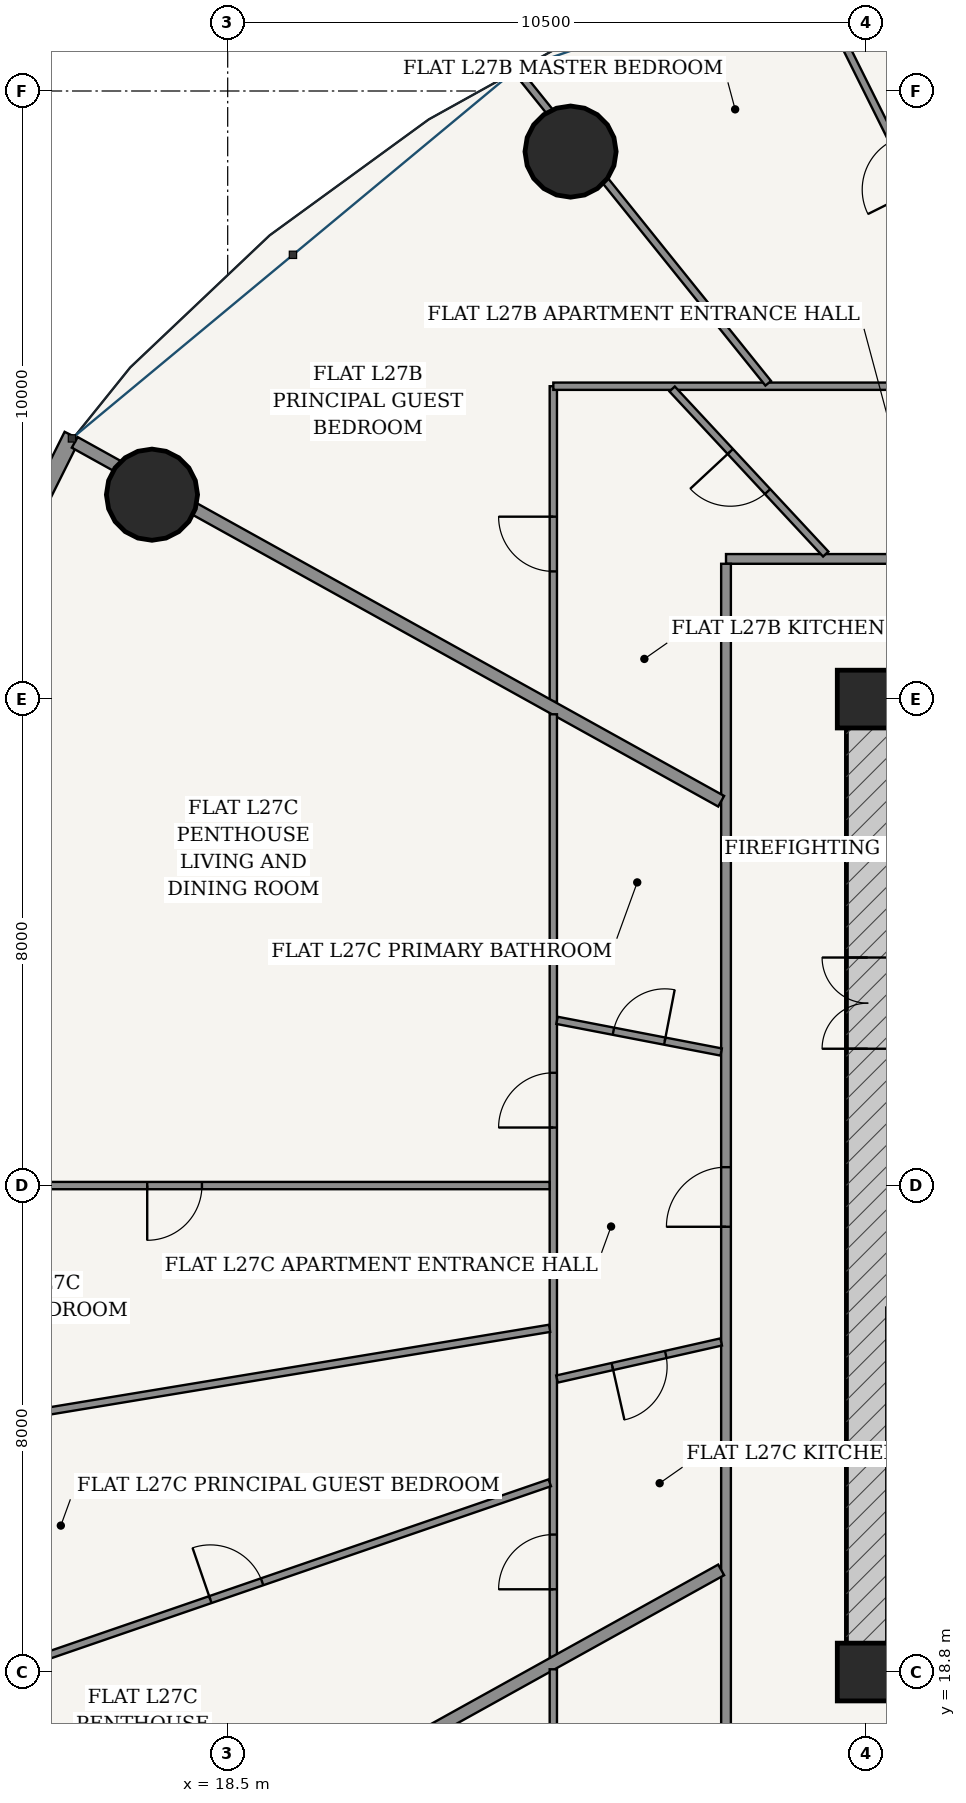
"""IFC4 building model, lengths in metres.
Left out: names, types, materials, properties, quantities, classifications, styles, units other than length and angle.
Written with IfcOpenShell. Run it as: python <this file> out.ifc"""

import sys

from ifc_helpers import new_model, si_unit, direction, frame, frame_2d, origin, origin_2d, place, context, subcontext, project, spatial, rectangle, hollow_circle, extrude, source, transform, mapped, element, fill, save


model = new_model("IFC4")
c1 = context("Model", 3, precision=1e-05, world=origin(), true_north=direction((-0.2419218956, 0.970295726276)))
c2 = subcontext(c1, "Body", "Model", "MODEL_VIEW")
j1 = project(units=[si_unit("LENGTHUNIT", "METRE"), si_unit("PLANEANGLEUNIT", "RADIAN")], contexts=[c1])
p1 = place(None, origin())
s1 = spatial("IfcSite", under=j1, at=p1, CompositionType="ELEMENT")
p2 = place(p1, origin())
s2 = spatial("IfcBuilding", under=s1, at=p2, CompositionType="ELEMENT")
p3 = place(p2, frame((0.0, 0.0, 105.0)))
s3 = spatial("IfcBuildingStorey", under=s2, at=p3, CompositionType="ELEMENT", Elevation=105.0)
for number, where, z_axis, x_axis in (
    (1, (29.0, 18.8, 0.0), (0.0, 0.0, 1.0), (1.0, 0.0, 0.0)),
    (2, (29.0, 34.8, 0.0), (0.0, 0.0, 1.0), (1.0, 0.0, 0.0)),
):
    element("IfcColumn", number, at=place(p3, frame(where, z_axis=z_axis, x_axis=x_axis)), inside=s3, PredefinedType="COLUMN", context=c2, shape_type="SweptSolid", body=[
        extrude(rectangle(XDim=0.95, YDim=0.95, at=origin_2d()), origin(), (0.0, 0.0, 1.0), 3.6),
    ])
p4 = place(p3, frame((28.675, 18.825, 0.0), z_axis=(0.0, 0.0, 1.0), x_axis=(1.0, 0.0, 0.0)))
e3 = element("IfcWall", 3, at=p4, inside=s3, PredefinedType="SHEAR", context=c2, shape_type="SweptSolid", body=[
    extrude(rectangle(XDim=18.65, YDim=0.7, at=frame_2d((9.325, 0.0))), origin(), (0.0, 0.0, 1.0), 3.325),
])
p5 = place(p4, frame((6.877, 0.0, 0.0)))
e4 = element("IfcOpeningElement", 4, at=p5, cuts=e3, PredefinedType="OPENING", context=c2, shape_type="SweptSolid", body=[
    extrude(rectangle(XDim=0.85, YDim=2.1, at=frame_2d((0.425, 1.05))), frame((0.0, 0.36, 0.0), z_axis=(0.0, -1.0, 0.0), x_axis=(1.0, 0.0, 0.0)), (0.0, 0.0, 1.0), 0.72),
])
p6 = place(p4, frame((8.9, 0.0, 0.0)))
e5 = element("IfcOpeningElement", 5, at=p6, cuts=e3, PredefinedType="OPENING", context=c2, shape_type="SweptSolid", body=[
    extrude(rectangle(XDim=0.85, YDim=2.1, at=frame_2d((0.425, 1.05))), frame((0.0, 0.36, 0.0), z_axis=(0.0, -1.0, 0.0), x_axis=(1.0, 0.0, 0.0)), (0.0, 0.0, 1.0), 0.72),
])
p7 = place(p4, frame((10.923, 0.0, 0.0)))
e6 = element("IfcOpeningElement", 6, at=p7, cuts=e3, PredefinedType="OPENING", context=c2, shape_type="SweptSolid", body=[
    extrude(rectangle(XDim=0.85, YDim=2.1, at=frame_2d((0.425, 1.05))), frame((0.0, 0.36, 0.0), z_axis=(0.0, -1.0, 0.0), x_axis=(1.0, 0.0, 0.0)), (0.0, 0.0, 1.0), 0.72),
])
p8 = place(p3, frame((28.675, 34.775, 0.0), z_axis=(0.0, 0.0, 1.0), x_axis=(1.0, 0.0, 0.0)))
e7 = element("IfcWall", 7, at=p8, inside=s3, PredefinedType="SHEAR", context=c2, shape_type="SweptSolid", body=[
    extrude(rectangle(XDim=18.65, YDim=0.7, at=frame_2d((9.325, 0.0))), origin(), (0.0, 0.0, 1.0), 3.325),
])
p9 = place(p8, frame((7.357, 0.0, 0.0)))
e8 = element("IfcOpeningElement", 8, at=p9, cuts=e7, PredefinedType="OPENING", context=c2, shape_type="SweptSolid", body=[
    extrude(rectangle(XDim=0.86, YDim=2.1, at=frame_2d((0.43, 1.05))), frame((0.0, 0.36, 0.0), z_axis=(0.0, -1.0, 0.0), x_axis=(1.0, 0.0, 0.0)), (0.0, 0.0, 1.0), 0.72),
])
p10 = place(p8, frame((10.438, 0.0, 0.0)))
e9 = element("IfcOpeningElement", 9, at=p10, cuts=e7, PredefinedType="OPENING", context=c2, shape_type="SweptSolid", body=[
    extrude(rectangle(XDim=0.85, YDim=2.1, at=frame_2d((0.425, 1.05))), frame((0.0, 0.36, 0.0), z_axis=(0.0, -1.0, 0.0), x_axis=(1.0, 0.0, 0.0)), (0.0, 0.0, 1.0), 0.72),
])
p11 = place(p3, frame((29.025, 19.175, 0.0), z_axis=(0.0, 0.0, 1.0), x_axis=(0.0, 1.0, 0.0)))
e10 = element("IfcWall", 10, at=p11, inside=s3, PredefinedType="SHEAR", context=c2, shape_type="SweptSolid", body=[
    extrude(rectangle(XDim=15.25, YDim=0.7, at=frame_2d((7.625, 0.0))), origin(), (0.0, 0.0, 1.0), 3.325),
])
p12 = place(p11, frame((9.875, 0.0, 0.0)))
e11 = element("IfcOpeningElement", 11, at=p12, cuts=e10, PredefinedType="OPENING", context=c2, shape_type="SweptSolid", body=[
    extrude(rectangle(XDim=1.5, YDim=2.2, at=frame_2d((0.75, 1.1))), frame((0.0, 0.36, 0.0), z_axis=(0.0, -1.0, 0.0), x_axis=(1.0, 0.0, 0.0)), (0.0, 0.0, 1.0), 0.72),
])
for number, where, z_axis, x_axis in (
    (12, (24.138, 43.803, 0.0), (0.0, 0.0, 1.0), (1.0, 0.0, 0.0)),
    (13, (17.255, 38.161, 0.0), (0.0, 0.0, 1.0), (1.0, 0.0, 0.0)),
):
    element("IfcColumn", number, at=place(p3, frame(where, z_axis=z_axis, x_axis=x_axis)), inside=s3, PredefinedType="COLUMN", context=c2, shape_type="SweptSolid", body=[
        extrude(hollow_circle(Radius=0.75, WallThickness=0.045, at=origin_2d()), origin(), (0.0, 0.0, 1.0), 3.6),
    ])
p13 = place(p3, frame((15.944, 39.133, 0.0), z_axis=(0.0, 0.0, 1.0), x_axis=(-0.446263788661, -0.894901464369, 0.0)))
e14 = element("IfcWall", 14, at=p13, inside=s3, PredefinedType="SOLIDWALL", context=c2, shape_type="SweptSolid", body=[
    extrude(rectangle(XDim=9.05, YDim=0.28, at=frame_2d((4.525, 0.0))), origin(), (0.0, 0.0, 1.0), 3.325),
])
p14 = place(p13, frame((1.394, 0.0, 0.85)))
e15 = element("IfcOpeningElement", 15, at=p14, cuts=e14, PredefinedType="OPENING", context=c2, shape_type="SweptSolid", body=[
    extrude(rectangle(XDim=2.1, YDim=1.95, at=frame_2d((1.05, 0.975))), frame((0.0, 0.15, 0.0), z_axis=(0.0, -1.0, 0.0), x_axis=(1.0, 0.0, 0.0)), (0.0, 0.0, 1.0), 0.3),
])
p15 = place(p13, frame((5.557, 0.0, 0.85)))
e16 = element("IfcOpeningElement", 16, at=p15, cuts=e14, PredefinedType="OPENING", context=c2, shape_type="SweptSolid", body=[
    extrude(rectangle(XDim=2.1, YDim=1.95, at=frame_2d((1.05, 0.975))), frame((0.0, 0.15, 0.0), z_axis=(0.0, -1.0, 0.0), x_axis=(1.0, 0.0, 0.0)), (0.0, 0.0, 1.0), 0.3),
])
p16 = place(p3, frame((26.695, 37.105, 0.0), z_axis=(0.0, 0.0, 1.0), x_axis=(1.0, 0.0, 0.0)))
e17 = element("IfcWall", 17, at=p16, inside=s3, PredefinedType="PARTITIONING", context=c2, shape_type="SweptSolid", body=[
    extrude(rectangle(XDim=22.61, YDim=0.16, at=frame_2d((11.305, 0.0))), origin(), (0.0, 0.0, 1.0), 2.767),
])
p17 = place(p16, frame((4.925, 0.0, 0.0)))
e18 = element("IfcOpeningElement", 18, at=p17, cuts=e17, PredefinedType="OPENING", context=c2, shape_type="SweptSolid", body=[
    extrude(rectangle(XDim=0.98, YDim=2.2, at=frame_2d((0.49, 1.1))), frame((0.0, 0.09, 0.0), z_axis=(0.0, -1.0, 0.0), x_axis=(1.0, 0.0, 0.0)), (0.0, 0.0, 1.0), 0.18),
])
p18 = place(p3, frame((26.695, 16.575, 0.0), z_axis=(0.0, 0.0, 1.0), x_axis=(0.0, 1.0, 0.0)))
e19 = element("IfcWall", 19, at=p18, inside=s3, PredefinedType="PARTITIONING", context=c2, shape_type="SweptSolid", body=[
    extrude(rectangle(XDim=20.45, YDim=0.16, at=frame_2d((10.225, 0.0))), origin(), (0.0, 0.0, 1.0), 2.767),
])
p19 = place(p18, frame((9.547, 0.0, 0.0)))
e20 = element("IfcOpeningElement", 20, at=p19, cuts=e19, PredefinedType="OPENING", context=c2, shape_type="SweptSolid", body=[
    extrude(rectangle(XDim=0.98, YDim=2.2, at=frame_2d((0.49, 1.1))), frame((0.0, 0.09, 0.0), z_axis=(0.0, -1.0, 0.0), x_axis=(1.0, 0.0, 0.0)), (0.0, 0.0, 1.0), 0.18),
])
p20 = place(p3, frame((23.855, 34.754, 0.0), z_axis=(0.0, 0.0, 1.0), x_axis=(0.0, 1.0, 0.0)))
e21 = element("IfcWall", 21, at=p20, inside=s3, PredefinedType="PARTITIONING", context=c2, shape_type="SweptSolid", body=[
    extrude(rectangle(XDim=5.191, YDim=0.12, at=frame_2d((2.595, 0.0))), origin(), (0.0, 0.0, 1.0), 3.004),
])
p21 = place(p20, frame((2.145, 0.0, 0.0)))
e22 = element("IfcOpeningElement", 22, at=p21, cuts=e21, PredefinedType="OPENING", context=c2, shape_type="SweptSolid", body=[
    extrude(rectangle(XDim=0.9, YDim=2.15, at=frame_2d((0.45, 1.075))), frame((0.0, 0.07, 0.0), z_axis=(0.0, -1.0, 0.0), x_axis=(1.0, 0.0, 0.0)), (0.0, 0.0, 1.0), 0.14),
])
p22 = place(p3, frame((23.855, 39.945, 0.0), z_axis=(0.0, 0.0, 1.0), x_axis=(1.0, 0.0, 0.0)))
e23 = element("IfcWall", 23, at=p22, inside=s3, PredefinedType="PARTITIONING", context=c2, shape_type="SweptSolid", body=[
    extrude(rectangle(XDim=17.19, YDim=0.12, at=frame_2d((8.595, 0.0))), origin(), (0.0, 0.0, 1.0), 2.767),
])
p23 = place(p22, frame((9.133, 0.0, 0.0)))
e24 = element("IfcOpeningElement", 24, at=p23, cuts=e23, PredefinedType="OPENING", context=c2, shape_type="SweptSolid", body=[
    extrude(rectangle(XDim=0.9, YDim=2.15, at=frame_2d((0.45, 1.075))), frame((0.0, 0.07, 0.0), z_axis=(0.0, -1.0, 0.0), x_axis=(1.0, 0.0, 0.0)), (0.0, 0.0, 1.0), 0.14),
])
p24 = place(p3, frame((31.419, 40.0, 0.0), z_axis=(0.0, 0.0, 1.0), x_axis=(-0.446188142997, 0.894939182877, 0.0)))
e25 = element("IfcWall", 25, at=p24, inside=s3, PredefinedType="PARTITIONING", context=c2, shape_type="SweptSolid", body=[
    extrude(rectangle(XDim=8.002, YDim=0.12, at=frame_2d((4.001, 0.0))), origin(), (0.0, 0.0, 1.0), 2.767),
])
p25 = place(p24, frame((3.551, 0.0, 0.0)))
e26 = element("IfcOpeningElement", 26, at=p25, cuts=e25, PredefinedType="OPENING", context=c2, shape_type="SweptSolid", body=[
    extrude(rectangle(XDim=0.9, YDim=2.15, at=frame_2d((0.45, 1.075))), frame((0.0, 0.07, 0.0), z_axis=(0.0, -1.0, 0.0), x_axis=(1.0, 0.0, 0.0)), (0.0, 0.0, 1.0), 0.14),
])
p26 = place(p3, frame((27.389, 39.993, 0.0), z_axis=(0.0, 0.0, 1.0), x_axis=(-0.626719700294, 0.779244773651, 0.0)))
e27 = element("IfcWall", 27, at=p26, inside=s3, PredefinedType="PARTITIONING", context=c2, shape_type="SweptSolid", body=[
    extrude(rectangle(XDim=6.537, YDim=0.12, at=frame_2d((3.269, 0.0))), origin(), (0.0, 0.0, 1.0), 2.767),
])
p27 = place(p3, frame((28.335, 37.185, 0.0), z_axis=(0.0, 0.0, 1.0), x_axis=(-0.681236086606, 0.732063791145, 0.0)))
e28 = element("IfcWall", 28, at=p27, inside=s3, PredefinedType="PARTITIONING", context=c2, shape_type="SweptSolid", body=[
    extrude(rectangle(XDim=3.708, YDim=0.12, at=frame_2d((1.854, 0.0))), origin(), (0.0, 0.0, 1.0), 2.767),
])
p28 = place(p27, frame((1.404, 0.0, 0.0)))
e29 = element("IfcOpeningElement", 29, at=p28, cuts=e28, PredefinedType="OPENING", context=c2, shape_type="SweptSolid", body=[
    extrude(rectangle(XDim=0.9, YDim=2.15, at=frame_2d((0.45, 1.075))), frame((0.0, 0.07, 0.0), z_axis=(0.0, -1.0, 0.0), x_axis=(1.0, 0.0, 0.0)), (0.0, 0.0, 1.0), 0.14),
])
p29 = place(p3, frame((26.615, 33.12, 0.0), z_axis=(0.0, 0.0, 1.0), x_axis=(-0.874319192772, 0.485351366692, 0.0)))
e30 = element("IfcWall", 30, at=p29, inside=s3, PredefinedType="PARTITIONING", context=c2, shape_type="SweptSolid", body=[
    extrude(rectangle(XDim=12.158, YDim=0.2, at=frame_2d((6.079, 0.0))), origin(), (0.0, 0.0, 1.0), 2.767),
])
p30 = place(p3, frame((23.855, 19.05, 0.0), z_axis=(0.0, 0.0, 1.0), x_axis=(0.0, 1.0, 0.0)))
e31 = element("IfcWall", 31, at=p30, inside=s3, PredefinedType="PARTITIONING", context=c2, shape_type="SweptSolid", body=[
    extrude(rectangle(XDim=15.501, YDim=0.12, at=frame_2d((7.75, 0.0))), origin(), (0.0, 0.0, 1.0), 2.767),
])
p31 = place(p30, frame((8.705, 0.0, 0.0)))
e32 = element("IfcOpeningElement", 32, at=p31, cuts=e31, PredefinedType="OPENING", context=c2, shape_type="SweptSolid", body=[
    extrude(rectangle(XDim=0.9, YDim=2.15, at=frame_2d((0.45, 1.075))), frame((0.0, 0.07, 0.0), z_axis=(0.0, -1.0, 0.0), x_axis=(1.0, 0.0, 0.0)), (0.0, 0.0, 1.0), 0.14),
])
p32 = place(p30, frame((1.111, 0.0, 0.0)))
e33 = element("IfcOpeningElement", 33, at=p32, cuts=e31, PredefinedType="OPENING", context=c2, shape_type="SweptSolid", body=[
    extrude(rectangle(XDim=0.9, YDim=2.15, at=frame_2d((0.45, 1.075))), frame((0.0, 0.07, 0.0), z_axis=(0.0, -1.0, 0.0), x_axis=(1.0, 0.0, 0.0)), (0.0, 0.0, 1.0), 0.14),
])
p33 = place(p3, frame((23.793, 26.8, 0.0), z_axis=(0.0, 0.0, 1.0), x_axis=(-1.0, 0.0, 0.0)))
e34 = element("IfcWall", 34, at=p33, inside=s3, PredefinedType="PARTITIONING", context=c2, shape_type="SweptSolid", body=[
    extrude(rectangle(XDim=12.333, YDim=0.12, at=frame_2d((6.167, 0.0))), origin(), (0.0, 0.0, 1.0), 2.767),
])
p34 = place(p33, frame((5.717, 0.0, 0.0)))
e35 = element("IfcOpeningElement", 35, at=p34, cuts=e34, PredefinedType="OPENING", context=c2, shape_type="SweptSolid", body=[
    extrude(rectangle(XDim=0.9, YDim=2.15, at=frame_2d((0.45, 1.075))), frame((0.0, 0.07, 0.0), z_axis=(0.0, -1.0, 0.0), x_axis=(1.0, 0.0, 0.0)), (0.0, 0.0, 1.0), 0.14),
])
p35 = place(p3, frame((23.794, 24.452, 0.0), z_axis=(0.0, 0.0, 1.0), x_axis=(-0.986620350945, -0.163034607068, 0.0)))
e36 = element("IfcWall", 36, at=p35, inside=s3, PredefinedType="PARTITIONING", context=c2, shape_type="SweptSolid", body=[
    extrude(rectangle(XDim=11.927, YDim=0.12, at=frame_2d((5.964, 0.0))), origin(), (0.0, 0.0, 1.0), 2.767),
])
p36 = place(p3, frame((23.796, 21.912, 0.0), z_axis=(0.0, 0.0, 1.0), x_axis=(-0.945574063861, -0.325406960209, 0.0)))
e37 = element("IfcWall", 37, at=p36, inside=s3, PredefinedType="PARTITIONING", context=c2, shape_type="SweptSolid", body=[
    extrude(rectangle(XDim=10.906, YDim=0.12, at=frame_2d((5.453, 0.0))), origin(), (0.0, 0.0, 1.0), 2.767),
])
p37 = place(p36, frame((5.003, 0.0, 0.0)))
e38 = element("IfcOpeningElement", 38, at=p37, cuts=e37, PredefinedType="OPENING", context=c2, shape_type="SweptSolid", body=[
    extrude(rectangle(XDim=0.9, YDim=2.15, at=frame_2d((0.45, 1.075))), frame((0.0, 0.07, 0.0), z_axis=(0.0, -1.0, 0.0), x_axis=(1.0, 0.0, 0.0)), (0.0, 0.0, 1.0), 0.14),
])
p38 = place(p3, frame((26.615, 28.996, 0.0), z_axis=(0.0, 0.0, 1.0), x_axis=(-0.98189351628, 0.18943368942, 0.0)))
e39 = element("IfcWall", 39, at=p38, inside=s3, PredefinedType="PARTITIONING", context=c2, shape_type="SweptSolid", body=[
    extrude(rectangle(XDim=2.749, YDim=0.12, at=frame_2d((1.375, 0.0))), origin(), (0.0, 0.0, 1.0), 3.325),
])
p39 = place(p38, frame((0.944, 0.0, 0.0)))
e40 = element("IfcOpeningElement", 40, at=p39, cuts=e39, PredefinedType="OPENING", context=c2, shape_type="SweptSolid", body=[
    extrude(rectangle(XDim=0.86, YDim=2.15, at=frame_2d((0.43, 1.075))), frame((0.0, 0.07, 0.0), z_axis=(0.0, -1.0, 0.0), x_axis=(1.0, 0.0, 0.0)), (0.0, 0.0, 1.0), 0.14),
])
p40 = place(p3, frame((26.615, 24.228, 0.0), z_axis=(0.0, 0.0, 1.0), x_axis=(-0.975417151515, -0.220366468706, 0.0)))
e41 = element("IfcWall", 41, at=p40, inside=s3, PredefinedType="PARTITIONING", context=c2, shape_type="SweptSolid", body=[
    extrude(rectangle(XDim=2.768, YDim=0.12, at=frame_2d((1.384, 0.0))), origin(), (0.0, 0.0, 1.0), 3.325),
])
p41 = place(p40, frame((0.934, 0.0, 0.0)))
e42 = element("IfcOpeningElement", 42, at=p41, cuts=e41, PredefinedType="OPENING", context=c2, shape_type="SweptSolid", body=[
    extrude(rectangle(XDim=0.9, YDim=2.15, at=frame_2d((0.45, 1.075))), frame((0.0, 0.07, 0.0), z_axis=(0.0, -1.0, 0.0), x_axis=(1.0, 0.0, 0.0)), (0.0, 0.0, 1.0), 0.14),
])
p42 = place(p3, frame((26.615, 20.48, 0.0), z_axis=(0.0, 0.0, 1.0), x_axis=(-0.874310671773, -0.48536671623, 0.0)))
e43 = element("IfcWall", 43, at=p42, inside=s3, PredefinedType="PARTITIONING", context=c2, shape_type="SweptSolid", body=[
    extrude(rectangle(XDim=12.159, YDim=0.2, at=frame_2d((6.079, 0.0))), origin(), (0.0, 0.0, 1.0), 2.767),
])
p43 = place(p3, frame((23.855, 13.655, 0.0), z_axis=(0.0, 0.0, 1.0), x_axis=(0.0, 1.0, 0.0)))
e44 = element("IfcWall", 44, at=p43, inside=s3, PredefinedType="PARTITIONING", context=c2, shape_type="SweptSolid", body=[
    extrude(rectangle(XDim=5.19, YDim=0.12, at=frame_2d((2.595, 0.0))), origin(), (0.0, 0.0, 1.0), 3.004),
])
m1 = source(origin(), c2, "Body", "SweptSolid", [
    extrude(rectangle(XDim=1.5, YDim=2.2, at=frame_2d((0.75, 1.1))), frame((0.0, 0.025, 0.0), z_axis=(0.0, -1.0, 0.0), x_axis=(1.0, 0.0, 0.0)), (0.0, 0.0, 1.0), 0.05),
])
p44 = place(p12, origin())
e45 = element("IfcDoor", 45, at=p44, inside=s3, OperationType="DOUBLE_DOOR_SINGLE_SWING", PredefinedType="DOOR", context=c2, shape_type="MappedRepresentation", body=[
    mapped(m1, transform((0.0, 0.0, 0.0), scale=1.0)),
])
fill(e11, e45)
m2 = source(origin(), c2, "Body", "SweptSolid", [
    extrude(rectangle(XDim=0.9, YDim=2.15, at=frame_2d((0.45, 1.075))), frame((0.0, 0.025, 0.0), z_axis=(0.0, -1.0, 0.0), x_axis=(1.0, 0.0, 0.0)), (0.0, 0.0, 1.0), 0.05),
])
p45 = place(p28, origin())
e46 = element("IfcDoor", 46, at=p45, inside=s3, OperationType="SINGLE_SWING_RIGHT", PredefinedType="DOOR", context=c2, shape_type="MappedRepresentation", body=[
    mapped(m2, transform((0.0, 0.0, 0.0), scale=1.0)),
])
fill(e29, e46)
p46 = place(p21, origin())
e47 = element("IfcDoor", 47, at=p46, inside=s3, OperationType="SINGLE_SWING_RIGHT", PredefinedType="DOOR", context=c2, shape_type="MappedRepresentation", body=[
    mapped(m2, transform((0.0, 0.0, 0.0), scale=1.0)),
])
fill(e22, e47)
m3 = source(origin(), c2, "Body", "SweptSolid", [
    extrude(rectangle(XDim=0.98, YDim=2.2, at=frame_2d((0.49, 1.1))), frame((0.0, 0.025, 0.0), z_axis=(0.0, -1.0, 0.0), x_axis=(1.0, 0.0, 0.0)), (0.0, 0.0, 1.0), 0.05),
])
p47 = place(p19, origin())
e48 = element("IfcDoor", 48, at=p47, inside=s3, OperationType="SINGLE_SWING_LEFT", PredefinedType="DOOR", context=c2, shape_type="MappedRepresentation", body=[
    mapped(m3, transform((0.0, 0.0, 0.0), scale=1.0)),
])
fill(e20, e48)
m4 = source(origin(), c2, "Body", "SweptSolid", [
    extrude(rectangle(XDim=0.86, YDim=2.15, at=frame_2d((0.43, 1.075))), frame((0.0, 0.025, 0.0), z_axis=(0.0, -1.0, 0.0), x_axis=(1.0, 0.0, 0.0)), (0.0, 0.0, 1.0), 0.05),
])
p48 = place(p39, frame((0.86, 0.0, 0.0), z_axis=(0.0, 0.0, 1.0), x_axis=(-1.0, 0.0, 0.0)))
e49 = element("IfcDoor", 49, at=p48, inside=s3, OperationType="SINGLE_SWING_RIGHT", PredefinedType="DOOR", context=c2, shape_type="MappedRepresentation", body=[
    mapped(m4, transform((0.0, 0.0, 0.0), scale=1.0)),
])
fill(e40, e49)
p49 = place(p31, origin())
e50 = element("IfcDoor", 50, at=p49, inside=s3, OperationType="SINGLE_SWING_LEFT", PredefinedType="DOOR", context=c2, shape_type="MappedRepresentation", body=[
    mapped(m2, transform((0.0, 0.0, 0.0), scale=1.0)),
])
fill(e32, e50)
p50 = place(p41, origin())
e51 = element("IfcDoor", 51, at=p50, inside=s3, OperationType="SINGLE_SWING_RIGHT", PredefinedType="DOOR", context=c2, shape_type="MappedRepresentation", body=[
    mapped(m2, transform((0.0, 0.0, 0.0), scale=1.0)),
])
fill(e42, e51)
p51 = place(p32, origin())
e52 = element("IfcDoor", 52, at=p51, inside=s3, OperationType="SINGLE_SWING_LEFT", PredefinedType="DOOR", context=c2, shape_type="MappedRepresentation", body=[
    mapped(m2, transform((0.0, 0.0, 0.0), scale=1.0)),
])
fill(e33, e52)
p52 = place(p34, origin())
e53 = element("IfcDoor", 53, at=p52, inside=s3, OperationType="SINGLE_SWING_RIGHT", PredefinedType="DOOR", context=c2, shape_type="MappedRepresentation", body=[
    mapped(m2, transform((0.0, 0.0, 0.0), scale=1.0)),
])
fill(e35, e53)
p53 = place(p37, frame((0.9, 0.0, 0.0), z_axis=(0.0, 0.0, 1.0), x_axis=(-1.0, 0.0, 0.0)))
e54 = element("IfcDoor", 54, at=p53, inside=s3, OperationType="SINGLE_SWING_LEFT", PredefinedType="DOOR", context=c2, shape_type="MappedRepresentation", body=[
    mapped(m2, transform((0.0, 0.0, 0.0), scale=1.0)),
])
fill(e38, e54)
save(model, sys.argv[1])
